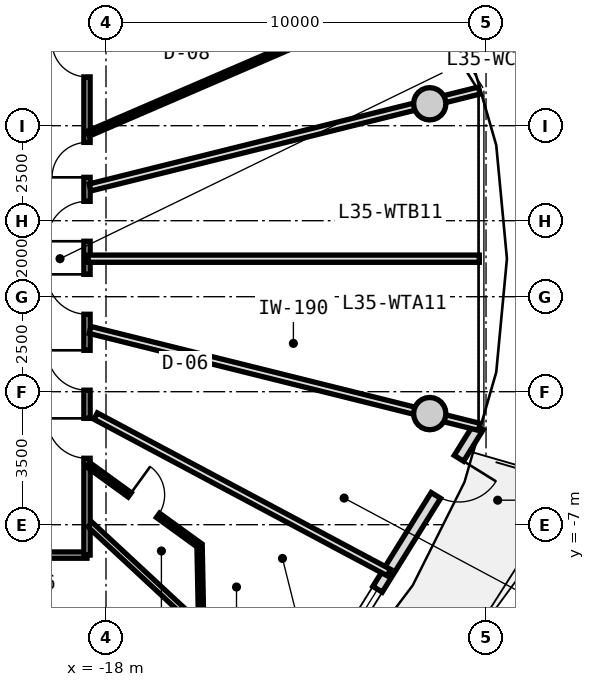
"""IFC4 building model, lengths in metres.
Left out: names, types, materials, properties, quantities, classifications, styles, units other than length and angle.
Written with IfcOpenShell. Run it as: python <this file> out.ifc"""

import sys

from ifc_helpers import new_model, si_unit, direction, frame, frame_2d, origin, origin_2d, place, context, subcontext, project, spatial, rectangle, circle, extrude, source, transform, mapped, element, fill, save


model = new_model("IFC4")
c1 = context("Model", 3, precision=1e-05, world=origin(), true_north=direction((0.0, 1.0)))
c2 = subcontext(c1, "Body", "Model", "MODEL_VIEW")
j1 = project(units=[si_unit("LENGTHUNIT", "METRE"), si_unit("PLANEANGLEUNIT", "RADIAN")], contexts=[c1])
p1 = place(None, origin())
s1 = spatial("IfcSite", under=j1, at=p1, CompositionType="ELEMENT")
p2 = place(p1, origin())
s2 = spatial("IfcBuilding", under=s1, at=p2, CompositionType="ELEMENT")
p3 = place(p2, frame((0.0, 0.0, 114.55)))
s3 = spatial("IfcBuildingStorey", under=s2, at=p3, CompositionType="ELEMENT", Elevation=114.55)
m1 = source(origin(), c2, "Body", "SweptSolid", [
    extrude(circle(Radius=0.425, at=origin_2d()), origin(), (0.0, 0.0, 1.0), 3.05),
])
for number, where, z_axis, x_axis in (
    (1, (-9.481, 4.076, 0.0), (0.0, 0.0, 1.0), (1.0, 0.0, 0.0)),
    (2, (-9.481, -4.076, 0.0), (0.0, 0.0, 1.0), (1.0, 0.0, 0.0)),
):
    element("IfcColumn", number, at=place(p3, frame(where, z_axis=z_axis, x_axis=x_axis)), inside=s3, PredefinedType="COLUMN", context=c2, shape_type="MappedRepresentation", body=[
        mapped(m1, transform((0.0, 0.0, 0.0), x_axis=(1.0, 0.0, 0.0), y_axis=(0.0, 1.0, 0.0), z_axis=(0.0, 0.0, 1.0), scale=1.0)),
    ])
m2 = source(origin(), c2, "Body", "SweptSolid", [
    extrude(rectangle(XDim=9.014, YDim=0.29, at=frame_2d((4.507, 0.0))), origin(), (0.0, 0.0, 1.0), 2.79),
])
p4 = place(p3, frame((-8.196, -4.421, 0.0), z_axis=(0.0, 0.0, 1.0), x_axis=(-0.527732945084, -0.849410347637, 0.0)))
e3 = element("IfcWall", 3, at=p4, inside=s3, PredefinedType="SOLIDWALL", context=c2, shape_type="MappedRepresentation", body=[
    mapped(m2, transform((0.0, 0.0, 0.0), x_axis=(1.0, 0.0, 0.0), y_axis=(0.0, 1.0, 0.0), z_axis=(0.0, 0.0, 1.0), scale=1.0)),
])
p5 = place(p4, frame((0.98, 0.0, 0.0)))
e4 = element("IfcOpeningElement", 4, at=p5, cuts=e3, PredefinedType="OPENING", context=c2, shape_type="SweptSolid", body=[
    extrude(rectangle(XDim=1.15, YDim=2.25, at=frame_2d((0.575, 1.125))), frame((0.0, 0.155, 0.0), z_axis=(0.0, -1.0, 0.0), x_axis=(1.0, 0.0, 0.0)), (0.0, 0.0, 1.0), 0.31),
])
p6 = place(p4, frame((5.037, 0.0, 0.85)))
e5 = element("IfcOpeningElement", 5, at=p6, cuts=e3, PredefinedType="OPENING", context=c2, shape_type="SweptSolid", body=[
    extrude(rectangle(XDim=1.2, YDim=1.5, at=frame_2d((0.6, 0.75))), frame((0.0, 0.155, 0.0), z_axis=(0.0, -1.0, 0.0), x_axis=(1.0, 0.0, 0.0)), (0.0, 0.0, 1.0), 0.31),
])
m3 = source(origin(), c2, "Body", "SweptSolid", [
    extrude(rectangle(XDim=8.6, YDim=0.165, at=frame_2d((4.3, 0.0))), origin(), (0.0, 0.0, 1.0), 2.775),
])
p7 = place(p3, frame((-18.5, -7.8, 0.0), z_axis=(0.0, 0.0, 1.0), x_axis=(-1.0, 0.0, 0.0)))
e6 = element("IfcWall", 6, at=p7, inside=s3, PredefinedType="PARTITIONING", context=c2, shape_type="MappedRepresentation", body=[
    mapped(m3, transform((0.0, 0.0, 0.0), x_axis=(1.0, 0.0, 0.0), y_axis=(0.0, 1.0, 0.0), z_axis=(0.0, 0.0, 1.0), scale=1.0)),
])
p8 = place(p7, frame((3.775, 0.0, 0.0)))
e7 = element("IfcOpeningElement", 7, at=p8, cuts=e6, PredefinedType="OPENING", context=c2, shape_type="SweptSolid", body=[
    extrude(rectangle(XDim=1.05, YDim=2.15, at=frame_2d((0.525, 1.075))), frame((0.0, 0.093, 0.0), z_axis=(0.0, -1.0, 0.0), x_axis=(1.0, 0.0, 0.0)), (0.0, 0.0, 1.0), 0.185),
])
m4 = source(origin(), c2, "Body", "SweptSolid", [
    extrude(rectangle(XDim=15.6, YDim=0.165, at=frame_2d((7.8, 0.0))), origin(), (0.0, 0.0, 1.0), 2.775),
])
p9 = place(p3, frame((-18.5, 7.8, 0.0), z_axis=(0.0, 0.0, 1.0), x_axis=(0.0, -1.0, 0.0)))
e8 = element("IfcWall", 8, at=p9, inside=s3, PredefinedType="PARTITIONING", context=c2, shape_type="MappedRepresentation", body=[
    mapped(m4, transform((0.0, 0.0, 0.0), x_axis=(1.0, 0.0, 0.0), y_axis=(0.0, 1.0, 0.0), z_axis=(0.0, 0.0, 1.0), scale=1.0)),
])
p10 = place(p9, frame((12.002, 0.0, 0.0)))
e9 = element("IfcOpeningElement", 9, at=p10, cuts=e8, PredefinedType="OPENING", context=c2, shape_type="SweptSolid", body=[
    extrude(rectangle(XDim=1.05, YDim=2.15, at=frame_2d((0.525, 1.075))), frame((0.0, 0.093, 0.0), z_axis=(0.0, -1.0, 0.0), x_axis=(1.0, 0.0, 0.0)), (0.0, 0.0, 1.0), 0.185),
])
p11 = place(p9, frame((10.211, 0.0, 0.0)))
e10 = element("IfcOpeningElement", 10, at=p11, cuts=e8, PredefinedType="OPENING", context=c2, shape_type="SweptSolid", body=[
    extrude(rectangle(XDim=1.05, YDim=2.15, at=frame_2d((0.525, 1.075))), frame((0.0, 0.093, 0.0), z_axis=(0.0, -1.0, 0.0), x_axis=(1.0, 0.0, 0.0)), (0.0, 0.0, 1.0), 0.185),
])
p12 = place(p9, frame((8.212, 0.0, 0.0)))
e11 = element("IfcOpeningElement", 11, at=p12, cuts=e8, PredefinedType="OPENING", context=c2, shape_type="SweptSolid", body=[
    extrude(rectangle(XDim=1.05, YDim=2.15, at=frame_2d((0.525, 1.075))), frame((0.0, 0.093, 0.0), z_axis=(0.0, -1.0, 0.0), x_axis=(1.0, 0.0, 0.0)), (0.0, 0.0, 1.0), 0.185),
])
p13 = place(p9, frame((6.291, 0.0, 0.0)))
e12 = element("IfcOpeningElement", 12, at=p13, cuts=e8, PredefinedType="OPENING", context=c2, shape_type="SweptSolid", body=[
    extrude(rectangle(XDim=1.05, YDim=2.15, at=frame_2d((0.525, 1.075))), frame((0.0, 0.093, 0.0), z_axis=(0.0, -1.0, 0.0), x_axis=(1.0, 0.0, 0.0)), (0.0, 0.0, 1.0), 0.185),
])
p14 = place(p9, frame((4.739, 0.0, 0.0)))
e13 = element("IfcOpeningElement", 13, at=p14, cuts=e8, PredefinedType="OPENING", context=c2, shape_type="SweptSolid", body=[
    extrude(rectangle(XDim=0.92, YDim=2.1, at=frame_2d((0.46, 1.05))), frame((0.0, 0.093, 0.0), z_axis=(0.0, -1.0, 0.0), x_axis=(1.0, 0.0, 0.0)), (0.0, 0.0, 1.0), 0.185),
])
p15 = place(p9, frame((2.096, 0.0, 0.0)))
e14 = element("IfcOpeningElement", 14, at=p15, cuts=e8, PredefinedType="OPENING", context=c2, shape_type="SweptSolid", body=[
    extrude(rectangle(XDim=0.92, YDim=2.1, at=frame_2d((0.46, 1.05))), frame((0.0, 0.093, 0.0), z_axis=(0.0, -1.0, 0.0), x_axis=(1.0, 0.0, 0.0)), (0.0, 0.0, 1.0), 0.185),
])
m5 = source(origin(), c2, "Body", "SweptSolid", [
    extrude(rectangle(XDim=7.482, YDim=0.165, at=frame_2d((3.741, 0.0))), origin(), (0.0, 0.0, 1.0), 2.275),
])
p16 = place(p3, frame((-18.42, -6.998, 0.0), z_axis=(0.0, 0.0, 1.0), x_axis=(0.732508698043, -0.680757671489, 0.0)))
e15 = element("IfcWall", 15, at=p16, inside=s3, PredefinedType="PARTITIONING", context=c2, shape_type="MappedRepresentation", body=[
    mapped(m5, transform((0.0, 0.0, 0.0), x_axis=(1.0, 0.0, 0.0), y_axis=(0.0, 1.0, 0.0), z_axis=(0.0, 0.0, 1.0), scale=1.0)),
])
m6 = source(origin(), c2, "Body", "SweptSolid", [
    extrude(rectangle(XDim=10.556, YDim=0.19, at=frame_2d((5.278, 0.0))), origin(), (0.0, 0.0, 1.0), 2.275),
])
p17 = place(p3, frame((-18.42, -1.875, 0.0), z_axis=(0.0, 0.0, 1.0), x_axis=(0.970363857851, -0.241648470667, 0.0)))
e16 = element("IfcWall", 16, at=p17, inside=s3, PredefinedType="PARTITIONING", context=c2, shape_type="MappedRepresentation", body=[
    mapped(m6, transform((0.0, 0.0, 0.0), x_axis=(1.0, 0.0, 0.0), y_axis=(0.0, 1.0, 0.0), z_axis=(0.0, 0.0, 1.0), scale=1.0)),
])
m7 = source(origin(), c2, "Body", "SweptSolid", [
    extrude(rectangle(XDim=8.744, YDim=0.19, at=frame_2d((4.372, 0.0))), origin(), (0.0, 0.0, 1.0), 2.775),
])
p18 = place(p3, frame((-18.273, -4.142, 0.0), z_axis=(0.0, 0.0, 1.0), x_axis=(0.882252449936, -0.470776607938, 0.0)))
e17 = element("IfcWall", 17, at=p18, inside=s3, PredefinedType="PARTITIONING", context=c2, shape_type="MappedRepresentation", body=[
    mapped(m7, transform((0.0, 0.0, 0.0), x_axis=(1.0, 0.0, 0.0), y_axis=(0.0, 1.0, 0.0), z_axis=(0.0, 0.0, 1.0), scale=1.0)),
])
m8 = source(origin(), c2, "Body", "SweptSolid", [
    extrude(rectangle(XDim=3.621, YDim=0.14, at=frame_2d((1.811, 0.0))), origin(), (0.0, 0.0, 1.0), 2.775),
])
p19 = place(p3, frame((-18.47, -5.422, 0.0), z_axis=(0.0, 0.0, 1.0), x_axis=(0.80968252222, -0.586868139544, 0.0)))
e18 = element("IfcWall", 18, at=p19, inside=s3, PredefinedType="PARTITIONING", context=c2, shape_type="MappedRepresentation", body=[
    mapped(m8, transform((0.0, 0.0, 0.0), x_axis=(1.0, 0.0, 0.0), y_axis=(0.0, 1.0, 0.0), z_axis=(0.0, 0.0, 1.0), scale=1.0)),
])
p20 = place(p19, frame((1.351, 0.0, 0.0)))
e19 = element("IfcOpeningElement", 19, at=p20, cuts=e18, PredefinedType="OPENING", context=c2, shape_type="SweptSolid", body=[
    extrude(rectangle(XDim=0.92, YDim=2.1, at=frame_2d((0.46, 1.05))), frame((0.0, 0.08, 0.0), z_axis=(0.0, -1.0, 0.0), x_axis=(1.0, 0.0, 0.0)), (0.0, 0.0, 1.0), 0.16),
])
m9 = source(origin(), c2, "Body", "SweptSolid", [
    extrude(rectangle(XDim=2.225, YDim=0.14, at=frame_2d((1.112, 0.0))), origin(), (0.0, 0.0, 1.0), 2.775),
])
p21 = place(p3, frame((-15.538, -7.547, 0.0), z_axis=(0.0, 0.0, 1.0), x_axis=(0.019971869027, -0.999800542332, 0.0)))
e20 = element("IfcWall", 20, at=p21, inside=s3, PredefinedType="PARTITIONING", context=c2, shape_type="MappedRepresentation", body=[
    mapped(m9, transform((0.0, 0.0, 0.0), x_axis=(1.0, 0.0, 0.0), y_axis=(0.0, 1.0, 0.0), z_axis=(0.0, 0.0, 1.0), scale=1.0)),
])
p22 = place(p3, frame((-18.42, 1.875, 0.0), z_axis=(0.0, 0.0, 1.0), x_axis=(0.970363857851, 0.241648470667, 0.0)))
e21 = element("IfcWall", 21, at=p22, inside=s3, PredefinedType="PARTITIONING", context=c2, shape_type="MappedRepresentation", body=[
    mapped(m6, transform((0.0, 0.0, 0.0), x_axis=(1.0, 0.0, 0.0), y_axis=(0.0, 1.0, 0.0), z_axis=(0.0, 0.0, 1.0), scale=1.0)),
])
m10 = source(origin(), c2, "Body", "SweptSolid", [
    extrude(rectangle(XDim=10.293, YDim=0.19, at=frame_2d((5.146, 0.0))), origin(), (0.0, 0.0, 1.0), 2.775),
])
p23 = place(p3, frame((-18.47, 0.0, 0.0), z_axis=(0.0, 0.0, 1.0), x_axis=(1.0, 0.0, 0.0)))
e22 = element("IfcWall", 22, at=p23, inside=s3, PredefinedType="PARTITIONING", context=c2, shape_type="MappedRepresentation", body=[
    mapped(m10, transform((0.0, 0.0, 0.0), x_axis=(1.0, 0.0, 0.0), y_axis=(0.0, 1.0, 0.0), z_axis=(0.0, 0.0, 1.0), scale=1.0)),
])
m11 = source(origin(), c2, "Body", "SweptSolid", [
    extrude(rectangle(XDim=9.447, YDim=0.14, at=frame_2d((4.724, 0.0))), origin(), (0.0, 0.0, 1.0), 2.775),
])
p24 = place(p3, frame((-18.47, 3.289, 0.0), z_axis=(0.0, 0.0, 1.0), x_axis=(0.918162367414, 0.396204324894, 0.0)))
e23 = element("IfcWall", 23, at=p24, inside=s3, PredefinedType="PARTITIONING", context=c2, shape_type="MappedRepresentation", body=[
    mapped(m11, transform((0.0, 0.0, 0.0), x_axis=(1.0, 0.0, 0.0), y_axis=(0.0, 1.0, 0.0), z_axis=(0.0, 0.0, 1.0), scale=1.0)),
])
m12 = source(origin(), c2, "Body", "SweptSolid", [
    extrude(rectangle(XDim=1.15, YDim=2.25, at=frame_2d((0.575, 1.125))), frame((0.0, 0.025, 0.0), z_axis=(0.0, -1.0, 0.0), x_axis=(1.0, 0.0, 0.0)), (0.0, 0.0, 1.0), 0.05),
])
p25 = place(p5, origin())
e24 = element("IfcDoor", 24, at=p25, inside=s3, OperationType="SINGLE_SWING_LEFT", PredefinedType="DOOR", context=c2, shape_type="MappedRepresentation", body=[
    mapped(m12, transform((0.0, 0.0, 0.0), x_axis=(1.0, 0.0, 0.0), y_axis=(0.0, 1.0, 0.0), z_axis=(0.0, 0.0, 1.0), scale=1.0)),
])
fill(e4, e24)
m13 = source(origin(), c2, "Body", "SweptSolid", [
    extrude(rectangle(XDim=1.2, YDim=1.5, at=frame_2d((0.6, 0.75))), frame((0.0, 0.03, 0.0), z_axis=(0.0, -1.0, 0.0), x_axis=(1.0, 0.0, 0.0)), (0.0, 0.0, 1.0), 0.06),
])
p26 = place(p6, origin())
e25 = element("IfcWindow", 25, at=p26, inside=s3, PartitioningType="SINGLE_PANEL", PredefinedType="WINDOW", context=c2, shape_type="MappedRepresentation", body=[
    mapped(m13, transform((0.0, 0.0, 0.0), x_axis=(1.0, 0.0, 0.0), y_axis=(0.0, 1.0, 0.0), z_axis=(0.0, 0.0, 1.0), scale=1.0)),
])
fill(e5, e25)
m14 = source(origin(), c2, "Body", "SweptSolid", [
    extrude(rectangle(XDim=1.05, YDim=2.15, at=frame_2d((0.525, 1.075))), frame((0.0, 0.025, 0.0), z_axis=(0.0, -1.0, 0.0), x_axis=(1.0, 0.0, 0.0)), (0.0, 0.0, 1.0), 0.05),
])
p27 = place(p10, frame((1.05, 0.0, 0.0), z_axis=(0.0, 0.0, 1.0), x_axis=(-1.0, 0.0, 0.0)))
e26 = element("IfcDoor", 26, at=p27, inside=s3, OperationType="SINGLE_SWING_RIGHT", PredefinedType="DOOR", context=c2, shape_type="MappedRepresentation", body=[
    mapped(m14, transform((0.0, 0.0, 0.0), x_axis=(1.0, 0.0, 0.0), y_axis=(0.0, 1.0, 0.0), z_axis=(0.0, 0.0, 1.0), scale=1.0)),
])
fill(e9, e26)
m15 = source(origin(), c2, "Body", "SweptSolid", [
    extrude(rectangle(XDim=0.92, YDim=2.1, at=frame_2d((0.46, 1.05))), frame((0.0, 0.025, 0.0), z_axis=(0.0, -1.0, 0.0), x_axis=(1.0, 0.0, 0.0)), (0.0, 0.0, 1.0), 0.05),
])
p28 = place(p20, origin())
e27 = element("IfcDoor", 27, at=p28, inside=s3, OperationType="SINGLE_SWING_LEFT", PredefinedType="DOOR", context=c2, shape_type="MappedRepresentation", body=[
    mapped(m15, transform((0.0, 0.0, 0.0), x_axis=(1.0, 0.0, 0.0), y_axis=(0.0, 1.0, 0.0), z_axis=(0.0, 0.0, 1.0), scale=1.0)),
])
fill(e19, e27)
p29 = place(p11, frame((1.05, 0.0, 0.0), z_axis=(0.0, 0.0, 1.0), x_axis=(-1.0, 0.0, 0.0)))
e28 = element("IfcDoor", 28, at=p29, inside=s3, OperationType="SINGLE_SWING_RIGHT", PredefinedType="DOOR", context=c2, shape_type="MappedRepresentation", body=[
    mapped(m14, transform((0.0, 0.0, 0.0), x_axis=(1.0, 0.0, 0.0), y_axis=(0.0, 1.0, 0.0), z_axis=(0.0, 0.0, 1.0), scale=1.0)),
])
fill(e10, e28)
p30 = place(p12, frame((1.05, 0.0, 0.0), z_axis=(0.0, 0.0, 1.0), x_axis=(-1.0, 0.0, 0.0)))
e29 = element("IfcDoor", 29, at=p30, inside=s3, OperationType="SINGLE_SWING_RIGHT", PredefinedType="DOOR", context=c2, shape_type="MappedRepresentation", body=[
    mapped(m14, transform((0.0, 0.0, 0.0), x_axis=(1.0, 0.0, 0.0), y_axis=(0.0, 1.0, 0.0), z_axis=(0.0, 0.0, 1.0), scale=1.0)),
])
fill(e11, e29)
p31 = place(p13, frame((1.05, 0.0, 0.0), z_axis=(0.0, 0.0, 1.0), x_axis=(-1.0, 0.0, 0.0)))
e30 = element("IfcDoor", 30, at=p31, inside=s3, OperationType="SINGLE_SWING_LEFT", PredefinedType="DOOR", context=c2, shape_type="MappedRepresentation", body=[
    mapped(m14, transform((0.0, 0.0, 0.0), x_axis=(1.0, 0.0, 0.0), y_axis=(0.0, 1.0, 0.0), z_axis=(0.0, 0.0, 1.0), scale=1.0)),
])
fill(e12, e30)
p32 = place(p14, frame((0.92, 0.0, 0.0), z_axis=(0.0, 0.0, 1.0), x_axis=(-1.0, 0.0, 0.0)))
e31 = element("IfcDoor", 31, at=p32, inside=s3, OperationType="SINGLE_SWING_LEFT", PredefinedType="DOOR", context=c2, shape_type="MappedRepresentation", body=[
    mapped(m15, transform((0.0, 0.0, 0.0), x_axis=(1.0, 0.0, 0.0), y_axis=(0.0, 1.0, 0.0), z_axis=(0.0, 0.0, 1.0), scale=1.0)),
])
fill(e13, e31)
p33 = place(p15, frame((0.92, 0.0, 0.0), z_axis=(0.0, 0.0, 1.0), x_axis=(-1.0, 0.0, 0.0)))
e32 = element("IfcDoor", 32, at=p33, inside=s3, OperationType="SINGLE_SWING_RIGHT", PredefinedType="DOOR", context=c2, shape_type="MappedRepresentation", body=[
    mapped(m15, transform((0.0, 0.0, 0.0), x_axis=(1.0, 0.0, 0.0), y_axis=(0.0, 1.0, 0.0), z_axis=(0.0, 0.0, 1.0), scale=1.0)),
])
fill(e14, e32)
save(model, sys.argv[1])
